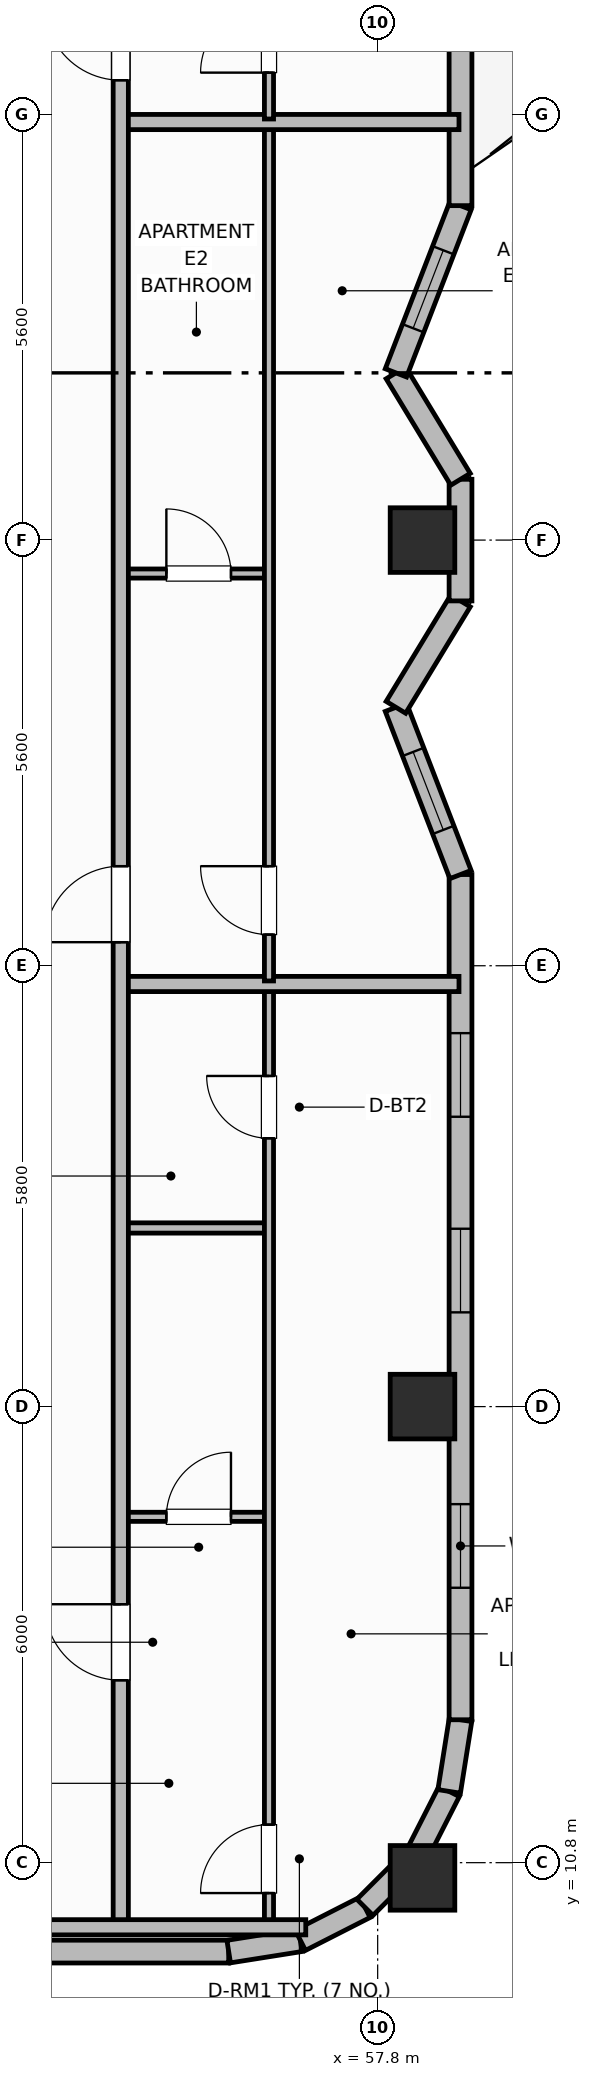
"""IFC4 building model, lengths in metres.
Left out: names, types, materials, properties, quantities, classifications, styles, units other than length and angle.
Written with IfcOpenShell. Run it as: python <this file> out.ifc"""

import sys

from ifc_helpers import new_model, si_unit, direction, frame, frame_2d, origin, origin_2d, place, context, subcontext, project, spatial, rectangle, extrude, element, fill, save


model = new_model("IFC4")
c1 = context("Model", 3, precision=1e-05, world=origin(), true_north=direction((0.0, 1.0)))
c2 = subcontext(c1, "Body", "Model", "MODEL_VIEW")
j1 = project(units=[si_unit("LENGTHUNIT", "METRE"), si_unit("PLANEANGLEUNIT", "RADIAN")], contexts=[c1])
p1 = place(None, origin())
s1 = spatial("IfcSite", under=j1, at=p1, CompositionType="ELEMENT")
p2 = place(p1, origin())
s2 = spatial("IfcBuilding", under=s1, at=p2, CompositionType="ELEMENT")
p3 = place(p2, frame((0.0, 0.0, 229.5)))
s3 = spatial("IfcBuildingStorey", under=s2, at=p3, CompositionType="ELEMENT", Elevation=229.5)
for number, where, z_axis, x_axis in (
    (1, (58.39, 10.6, 0.0), (0.0, 0.0, 1.0), (1.0, 0.0, 0.0)),
    (2, (58.39, 16.8, 0.0), (0.0, 0.0, 1.0), (1.0, 0.0, 0.0)),
    (3, (58.39, 28.2, 0.0), (0.0, 0.0, 1.0), (1.0, 0.0, 0.0)),
):
    element("IfcColumn", number, at=place(p3, frame(where, z_axis=z_axis, x_axis=x_axis)), inside=s3, PredefinedType="COLUMN", context=c2, shape_type="SweptSolid", body=[
        extrude(rectangle(XDim=0.85, YDim=0.85, at=origin_2d()), origin(), (0.0, 0.0, 1.0), 3.7),
    ])
p4 = place(p3, frame((22.56, 9.63, 0.0), z_axis=(0.0, 0.0, 1.0), x_axis=(1.0, 0.0, 0.0)))
e4 = element("IfcWall", 4, at=p4, inside=s3, PredefinedType="SOLIDWALL", context=c2, shape_type="SweptSolid", body=[
    extrude(rectangle(XDim=33.28, YDim=0.3, at=frame_2d((16.64, 0.0))), origin(), (0.0, 0.0, 1.0), 2.73),
])
p5 = place(p4, frame((4.747, 0.0, 0.76)))
e5 = element("IfcOpeningElement", 5, at=p5, cuts=e4, PredefinedType="OPENING", context=c2, shape_type="SweptSolid", body=[
    extrude(rectangle(XDim=1.4, YDim=1.85, at=frame_2d((0.7, 0.925))), frame((0.0, 0.16, 0.0), z_axis=(0.0, -1.0, 0.0), x_axis=(1.0, 0.0, 0.0)), (0.0, 0.0, 1.0), 0.32),
])
p6 = place(p4, frame((7.945, 0.0, 0.76)))
e6 = element("IfcOpeningElement", 6, at=p6, cuts=e4, PredefinedType="OPENING", context=c2, shape_type="SweptSolid", body=[
    extrude(rectangle(XDim=1.4, YDim=1.85, at=frame_2d((0.7, 0.925))), frame((0.0, 0.16, 0.0), z_axis=(0.0, -1.0, 0.0), x_axis=(1.0, 0.0, 0.0)), (0.0, 0.0, 1.0), 0.32),
])
p7 = place(p4, frame((14.341, 0.0, 0.76)))
e7 = element("IfcOpeningElement", 7, at=p7, cuts=e4, PredefinedType="OPENING", context=c2, shape_type="SweptSolid", body=[
    extrude(rectangle(XDim=1.4, YDim=1.85, at=frame_2d((0.7, 0.925))), frame((0.0, 0.16, 0.0), z_axis=(0.0, -1.0, 0.0), x_axis=(1.0, 0.0, 0.0)), (0.0, 0.0, 1.0), 0.32),
])
p8 = place(p4, frame((17.539, 0.0, 0.76)))
e8 = element("IfcOpeningElement", 8, at=p8, cuts=e4, PredefinedType="OPENING", context=c2, shape_type="SweptSolid", body=[
    extrude(rectangle(XDim=1.4, YDim=1.85, at=frame_2d((0.7, 0.925))), frame((0.0, 0.16, 0.0), z_axis=(0.0, -1.0, 0.0), x_axis=(1.0, 0.0, 0.0)), (0.0, 0.0, 1.0), 0.32),
])
p9 = place(p4, frame((23.935, 0.0, 0.76)))
e9 = element("IfcOpeningElement", 9, at=p9, cuts=e4, PredefinedType="OPENING", context=c2, shape_type="SweptSolid", body=[
    extrude(rectangle(XDim=1.4, YDim=1.85, at=frame_2d((0.7, 0.925))), frame((0.0, 0.16, 0.0), z_axis=(0.0, -1.0, 0.0), x_axis=(1.0, 0.0, 0.0)), (0.0, 0.0, 1.0), 0.32),
])
p10 = place(p4, frame((27.133, 0.0, 0.76)))
e10 = element("IfcOpeningElement", 10, at=p10, cuts=e4, PredefinedType="OPENING", context=c2, shape_type="SweptSolid", body=[
    extrude(rectangle(XDim=1.4, YDim=1.85, at=frame_2d((0.7, 0.925))), frame((0.0, 0.16, 0.0), z_axis=(0.0, -1.0, 0.0), x_axis=(1.0, 0.0, 0.0)), (0.0, 0.0, 1.0), 0.32),
])
p11 = place(p3, frame((55.84, 9.63, 0.0), z_axis=(0.0, 0.0, 1.0), x_axis=(0.987663181641, 0.156593229835, 0.0)))
e11 = element("IfcWall", 11, at=p11, inside=s3, PredefinedType="SOLIDWALL", context=c2, shape_type="SweptSolid", body=[
    extrude(rectangle(XDim=0.954, YDim=0.3, at=frame_2d((0.477, 0.0))), origin(), (0.0, 0.0, 1.0), 2.73),
])
for number, where, z_axis, x_axis in (
    (12, (56.782, 9.779, 0.0), (0.0, 0.0, 1.0), (0.891, 0.454, 0.0)),
    (13, (57.633, 10.212, 0.0), (0.0, 0.0, 1.0), (0.707, 0.707, 0.0)),
    (14, (58.308, 10.887, 0.0), (0.0, 0.0, 1.0), (0.454, 0.891, 0.0)),
):
    element("IfcWall", number, at=place(p3, frame(where, z_axis=z_axis, x_axis=x_axis)), inside=s3, PredefinedType="SOLIDWALL", context=c2, shape_type="SweptSolid", body=[
        extrude(rectangle(XDim=0.954, YDim=0.3, at=frame_2d((0.477, 0.0))), origin(), (0.0, 0.0, 1.0), 2.73),
    ])
p12 = place(p3, frame((58.741, 11.738, 0.0), z_axis=(0.0, 0.0, 1.0), x_axis=(0.156343617883, 0.987702725088, 0.0)))
e15 = element("IfcWall", 15, at=p12, inside=s3, PredefinedType="SOLIDWALL", context=c2, shape_type="SweptSolid", body=[
    extrude(rectangle(XDim=0.954, YDim=0.3, at=frame_2d((0.477, 0.0))), origin(), (0.0, 0.0, 1.0), 2.73),
])
p13 = place(p3, frame((58.89, 12.68, 0.0), z_axis=(0.0, 0.0, 1.0), x_axis=(0.0, 1.0, 0.0)))
e16 = element("IfcWall", 16, at=p13, inside=s3, PredefinedType="SOLIDWALL", context=c2, shape_type="SweptSolid", body=[
    extrude(rectangle(XDim=11.12, YDim=0.3, at=frame_2d((5.56, 0.0))), origin(), (0.0, 0.0, 1.0), 2.73),
])
p14 = place(p13, frame((1.737, 0.0, 0.95)))
e17 = element("IfcOpeningElement", 17, at=p14, cuts=e16, PredefinedType="OPENING", context=c2, shape_type="SweptSolid", body=[
    extrude(rectangle(XDim=1.1, YDim=1.65, at=frame_2d((0.55, 0.825))), frame((0.0, 0.16, 0.0), z_axis=(0.0, -1.0, 0.0), x_axis=(1.0, 0.0, 0.0)), (0.0, 0.0, 1.0), 0.32),
])
p15 = place(p13, frame((5.36, 0.0, 0.95)))
e18 = element("IfcOpeningElement", 18, at=p15, cuts=e16, PredefinedType="OPENING", context=c2, shape_type="SweptSolid", body=[
    extrude(rectangle(XDim=1.1, YDim=1.65, at=frame_2d((0.55, 0.825))), frame((0.0, 0.16, 0.0), z_axis=(0.0, -1.0, 0.0), x_axis=(1.0, 0.0, 0.0)), (0.0, 0.0, 1.0), 0.32),
])
p16 = place(p13, frame((7.933, 0.0, 0.95)))
e19 = element("IfcOpeningElement", 19, at=p16, cuts=e16, PredefinedType="OPENING", context=c2, shape_type="SweptSolid", body=[
    extrude(rectangle(XDim=1.1, YDim=1.65, at=frame_2d((0.55, 0.825))), frame((0.0, 0.16, 0.0), z_axis=(0.0, -1.0, 0.0), x_axis=(1.0, 0.0, 0.0)), (0.0, 0.0, 1.0), 0.32),
])
p17 = place(p3, frame((58.89, 23.8, 0.0), z_axis=(0.0, 0.0, 1.0), x_axis=(-0.360352194711, 0.932816324775, 0.0)))
e20 = element("IfcWall", 20, at=p17, inside=s3, PredefinedType="SOLIDWALL", context=c2, shape_type="SweptSolid", body=[
    extrude(rectangle(XDim=2.358, YDim=0.3, at=frame_2d((1.179, 0.0))), origin(), (0.0, 0.0, 1.0), 2.73),
])
p18 = place(p17, frame((0.629, 0.0, 0.92)))
e21 = element("IfcOpeningElement", 21, at=p18, cuts=e20, PredefinedType="OPENING", context=c2, shape_type="SweptSolid", body=[
    extrude(rectangle(XDim=1.1, YDim=1.65, at=frame_2d((0.55, 0.825))), frame((0.0, 0.16, 0.0), z_axis=(0.0, -1.0, 0.0), x_axis=(1.0, 0.0, 0.0)), (0.0, 0.0, 1.0), 0.32),
])
p19 = place(p3, frame((58.04, 26.0, 0.0), z_axis=(0.0, 0.0, 1.0), x_axis=(0.518939231806, 0.854811133346, 0.0)))
e22 = element("IfcWall", 22, at=p19, inside=s3, PredefinedType="SOLIDWALL", context=c2, shape_type="SweptSolid", body=[
    extrude(rectangle(XDim=1.638, YDim=0.3, at=frame_2d((0.819, 0.0))), origin(), (0.0, 0.0, 1.0), 2.73),
])
p20 = place(p3, frame((58.89, 27.4, 0.0), z_axis=(0.0, 0.0, 1.0), x_axis=(0.0, 1.0, 0.0)))
e23 = element("IfcWall", 23, at=p20, inside=s3, PredefinedType="SOLIDWALL", context=c2, shape_type="SweptSolid", body=[
    extrude(rectangle(XDim=1.6, YDim=0.3, at=frame_2d((0.8, 0.0))), origin(), (0.0, 0.0, 1.0), 2.73),
])
p21 = place(p3, frame((58.89, 29.0, 0.0), z_axis=(0.0, 0.0, 1.0), x_axis=(-0.518939231806, 0.854811133346, 0.0)))
e24 = element("IfcWall", 24, at=p21, inside=s3, PredefinedType="SOLIDWALL", context=c2, shape_type="SweptSolid", body=[
    extrude(rectangle(XDim=1.638, YDim=0.3, at=frame_2d((0.819, 0.0))), origin(), (0.0, 0.0, 1.0), 2.73),
])
p22 = place(p3, frame((58.04, 30.4, 0.0), z_axis=(0.0, 0.0, 1.0), x_axis=(0.360317400447, 0.932829765249, 0.0)))
e25 = element("IfcWall", 25, at=p22, inside=s3, PredefinedType="SOLIDWALL", context=c2, shape_type="SweptSolid", body=[
    extrude(rectangle(XDim=2.359, YDim=0.3, at=frame_2d((1.179, 0.0))), origin(), (0.0, 0.0, 1.0), 2.73),
])
p23 = place(p22, frame((0.629, 0.0, 0.92)))
e26 = element("IfcOpeningElement", 26, at=p23, cuts=e25, PredefinedType="OPENING", context=c2, shape_type="SweptSolid", body=[
    extrude(rectangle(XDim=1.1, YDim=1.65, at=frame_2d((0.55, 0.825))), frame((0.0, 0.16, 0.0), z_axis=(0.0, -1.0, 0.0), x_axis=(1.0, 0.0, 0.0)), (0.0, 0.0, 1.0), 0.32),
])
p24 = place(p3, frame((58.89, 32.6, 0.0), z_axis=(0.0, 0.0, 1.0), x_axis=(0.0, 1.0, 0.0)))
e27 = element("IfcWall", 27, at=p24, inside=s3, PredefinedType="SOLIDWALL", context=c2, shape_type="SweptSolid", body=[
    extrude(rectangle(XDim=11.12, YDim=0.3, at=frame_2d((5.56, 0.0))), origin(), (0.0, 0.0, 1.0), 2.73),
])
p25 = place(p24, frame((2.1, 0.0, 0.0)))
e28 = element("IfcOpeningElement", 28, at=p25, cuts=e27, PredefinedType="OPENING", context=c2, shape_type="SweptSolid", body=[
    extrude(rectangle(XDim=1.6, YDim=2.1, at=frame_2d((0.8, 1.05))), frame((0.0, 0.16, 0.0), z_axis=(0.0, -1.0, 0.0), x_axis=(1.0, 0.0, 0.0)), (0.0, 0.0, 1.0), 0.32),
])
p26 = place(p3, frame((54.42, 15.35, 0.0), z_axis=(0.0, 0.0, 1.0), x_axis=(1.0, 0.0, 0.0)))
e29 = element("IfcWall", 29, at=p26, inside=s3, PredefinedType="PARTITIONING", context=c2, shape_type="SweptSolid", body=[
    extrude(rectangle(XDim=1.95, YDim=0.12, at=frame_2d((0.975, 0.0))), origin(), (0.0, 0.0, 1.0), 2.56),
])
p27 = place(p26, frame((0.6, 0.0, 0.0)))
e30 = element("IfcOpeningElement", 30, at=p27, cuts=e29, PredefinedType="OPENING", context=c2, shape_type="SweptSolid", body=[
    extrude(rectangle(XDim=0.85, YDim=2.1, at=frame_2d((0.425, 1.05))), frame((0.0, 0.07, 0.0), z_axis=(0.0, -1.0, 0.0), x_axis=(1.0, 0.0, 0.0)), (0.0, 0.0, 1.0), 0.14),
])
p28 = place(p3, frame((54.42, 19.15, 0.0), z_axis=(0.0, 0.0, 1.0), x_axis=(1.0, 0.0, 0.0)))
e31 = element("IfcWall", 31, at=p28, inside=s3, PredefinedType="PARTITIONING", context=c2, shape_type="SweptSolid", body=[
    extrude(rectangle(XDim=1.95, YDim=0.135, at=frame_2d((0.975, 0.0))), origin(), (0.0, 0.0, 1.0), 2.56),
])
p29 = place(p3, frame((56.37, 9.99, 0.0), z_axis=(0.0, 0.0, 1.0), x_axis=(0.0, 1.0, 0.0)))
e32 = element("IfcWall", 32, at=p29, inside=s3, PredefinedType="PARTITIONING", context=c2, shape_type="SweptSolid", body=[
    extrude(rectangle(XDim=12.33, YDim=0.12, at=frame_2d((6.165, 0.0))), origin(), (0.0, 0.0, 1.0), 2.56),
])
p30 = place(p29, frame((0.41, 0.0, 0.0)))
e33 = element("IfcOpeningElement", 33, at=p30, cuts=e32, PredefinedType="OPENING", context=c2, shape_type="SweptSolid", body=[
    extrude(rectangle(XDim=0.9, YDim=2.1, at=frame_2d((0.45, 1.05))), frame((0.0, 0.07, 0.0), z_axis=(0.0, -1.0, 0.0), x_axis=(1.0, 0.0, 0.0)), (0.0, 0.0, 1.0), 0.14),
])
p31 = place(p29, frame((10.34, 0.0, 0.0)))
e34 = element("IfcOpeningElement", 34, at=p31, cuts=e32, PredefinedType="OPENING", context=c2, shape_type="SweptSolid", body=[
    extrude(rectangle(XDim=0.82, YDim=2.08, at=frame_2d((0.41, 1.04))), frame((0.0, 0.07, 0.0), z_axis=(0.0, -1.0, 0.0), x_axis=(1.0, 0.0, 0.0)), (0.0, 0.0, 1.0), 0.14),
])
p32 = place(p3, frame((54.42, 22.36, 0.0), z_axis=(0.0, 0.0, 1.0), x_axis=(1.0, 0.0, 0.0)))
e35 = element("IfcWall", 35, at=p32, inside=s3, PredefinedType="PARTITIONING", context=c2, shape_type="SweptSolid", body=[
    extrude(rectangle(XDim=4.45, YDim=0.2, at=frame_2d((2.225, 0.0))), origin(), (0.0, 0.0, 1.0), 2.56),
])
p33 = place(p3, frame((54.42, 27.76, 0.0), z_axis=(0.0, 0.0, 1.0), x_axis=(1.0, 0.0, 0.0)))
e36 = element("IfcWall", 36, at=p33, inside=s3, PredefinedType="PARTITIONING", context=c2, shape_type="SweptSolid", body=[
    extrude(rectangle(XDim=1.95, YDim=0.12, at=frame_2d((0.975, 0.0))), origin(), (0.0, 0.0, 1.0), 2.56),
])
p34 = place(p33, frame((0.6, 0.0, 0.0)))
e37 = element("IfcOpeningElement", 37, at=p34, cuts=e36, PredefinedType="OPENING", context=c2, shape_type="SweptSolid", body=[
    extrude(rectangle(XDim=0.85, YDim=2.1, at=frame_2d((0.425, 1.05))), frame((0.0, 0.07, 0.0), z_axis=(0.0, -1.0, 0.0), x_axis=(1.0, 0.0, 0.0)), (0.0, 0.0, 1.0), 0.14),
])
p35 = place(p3, frame((56.37, 22.4, 0.0), z_axis=(0.0, 0.0, 1.0), x_axis=(0.0, 1.0, 0.0)))
e38 = element("IfcWall", 38, at=p35, inside=s3, PredefinedType="PARTITIONING", context=c2, shape_type="SweptSolid", body=[
    extrude(rectangle(XDim=11.26, YDim=0.12, at=frame_2d((5.63, 0.0))), origin(), (0.0, 0.0, 1.0), 2.56),
])
p36 = place(p35, frame((0.61, 0.0, 0.0)))
e39 = element("IfcOpeningElement", 39, at=p36, cuts=e38, PredefinedType="OPENING", context=c2, shape_type="SweptSolid", body=[
    extrude(rectangle(XDim=0.9, YDim=2.1, at=frame_2d((0.45, 1.05))), frame((0.0, 0.07, 0.0), z_axis=(0.0, -1.0, 0.0), x_axis=(1.0, 0.0, 0.0)), (0.0, 0.0, 1.0), 0.14),
])
p37 = place(p3, frame((54.42, 33.7, 0.0), z_axis=(0.0, 0.0, 1.0), x_axis=(1.0, 0.0, 0.0)))
e40 = element("IfcWall", 40, at=p37, inside=s3, PredefinedType="PARTITIONING", context=c2, shape_type="SweptSolid", body=[
    extrude(rectangle(XDim=4.45, YDim=0.2, at=frame_2d((2.225, 0.0))), origin(), (0.0, 0.0, 1.0), 2.56),
])
p38 = place(p3, frame((56.37, 33.74, 0.0), z_axis=(0.0, 0.0, 1.0), x_axis=(0.0, 1.0, 0.0)))
e41 = element("IfcWall", 41, at=p38, inside=s3, PredefinedType="PARTITIONING", context=c2, shape_type="SweptSolid", body=[
    extrude(rectangle(XDim=12.67, YDim=0.12, at=frame_2d((6.335, 0.0))), origin(), (0.0, 0.0, 1.0), 2.56),
])
p39 = place(p38, frame((0.61, 0.0, 0.0)))
e42 = element("IfcOpeningElement", 42, at=p39, cuts=e41, PredefinedType="OPENING", context=c2, shape_type="SweptSolid", body=[
    extrude(rectangle(XDim=0.9, YDim=2.1, at=frame_2d((0.45, 1.05))), frame((0.0, 0.07, 0.0), z_axis=(0.0, -1.0, 0.0), x_axis=(1.0, 0.0, 0.0)), (0.0, 0.0, 1.0), 0.14),
])
p40 = place(p38, frame((10.51, 0.0, 0.0)))
e43 = element("IfcOpeningElement", 43, at=p40, cuts=e41, PredefinedType="OPENING", context=c2, shape_type="SweptSolid", body=[
    extrude(rectangle(XDim=0.82, YDim=2.08, at=frame_2d((0.41, 1.04))), frame((0.0, 0.07, 0.0), z_axis=(0.0, -1.0, 0.0), x_axis=(1.0, 0.0, 0.0)), (0.0, 0.0, 1.0), 0.14),
])
p41 = place(p3, frame((54.42, 9.95, 0.0), z_axis=(0.0, 0.0, 1.0), x_axis=(0.0, 1.0, 0.0)))
e44 = element("IfcWall", 44, at=p41, inside=s3, PredefinedType="PARTITIONING", context=c2, shape_type="SweptSolid", body=[
    extrude(rectangle(XDim=36.5, YDim=0.2, at=frame_2d((18.25, 0.0))), origin(), (0.0, 0.0, 1.0), 2.56),
])
p42 = place(p41, frame((3.25, 0.0, 0.0)))
e45 = element("IfcOpeningElement", 45, at=p42, cuts=e44, PredefinedType="OPENING", context=c2, shape_type="SweptSolid", body=[
    extrude(rectangle(XDim=1.0, YDim=2.15, at=frame_2d((0.5, 1.075))), frame((0.0, 0.11, 0.0), z_axis=(0.0, -1.0, 0.0), x_axis=(1.0, 0.0, 0.0)), (0.0, 0.0, 1.0), 0.22),
])
p43 = place(p41, frame((12.96, 0.0, 0.0)))
e46 = element("IfcOpeningElement", 46, at=p43, cuts=e44, PredefinedType="OPENING", context=c2, shape_type="SweptSolid", body=[
    extrude(rectangle(XDim=1.0, YDim=2.15, at=frame_2d((0.5, 1.075))), frame((0.0, 0.11, 0.0), z_axis=(0.0, -1.0, 0.0), x_axis=(1.0, 0.0, 0.0)), (0.0, 0.0, 1.0), 0.22),
])
p44 = place(p41, frame((24.3, 0.0, 0.0)))
e47 = element("IfcOpeningElement", 47, at=p44, cuts=e44, PredefinedType="OPENING", context=c2, shape_type="SweptSolid", body=[
    extrude(rectangle(XDim=1.0, YDim=2.15, at=frame_2d((0.5, 1.075))), frame((0.0, 0.11, 0.0), z_axis=(0.0, -1.0, 0.0), x_axis=(1.0, 0.0, 0.0)), (0.0, 0.0, 1.0), 0.22),
])
p45 = place(p3, frame((53.1, 9.95, 0.0), z_axis=(0.0, 0.0, 1.0), x_axis=(1.0, 0.0, 0.0)))
e48 = element("IfcWall", 48, at=p45, inside=s3, PredefinedType="PARTITIONING", context=c2, shape_type="SweptSolid", body=[
    extrude(rectangle(XDim=3.754, YDim=0.2, at=frame_2d((1.877, 0.0))), origin(), (0.0, 0.0, 1.0), 2.56),
])
p46 = place(p14, origin())
e49 = element("IfcWindow", 49, at=p46, inside=s3, PartitioningType="SINGLE_PANEL", PredefinedType="WINDOW", context=c2, shape_type="SweptSolid", body=[
    extrude(rectangle(XDim=1.1, YDim=1.65, at=frame_2d((0.55, 0.825))), frame((0.0, 0.03, 0.0), z_axis=(0.0, -1.0, 0.0), x_axis=(1.0, 0.0, 0.0)), (0.0, 0.0, 1.0), 0.06),
])
fill(e17, e49)
p47 = place(p15, origin())
e50 = element("IfcWindow", 50, at=p47, inside=s3, PartitioningType="SINGLE_PANEL", PredefinedType="WINDOW", context=c2, shape_type="SweptSolid", body=[
    extrude(rectangle(XDim=1.1, YDim=1.65, at=frame_2d((0.55, 0.825))), frame((0.0, 0.03, 0.0), z_axis=(0.0, -1.0, 0.0), x_axis=(1.0, 0.0, 0.0)), (0.0, 0.0, 1.0), 0.06),
])
fill(e18, e50)
p48 = place(p16, origin())
e51 = element("IfcWindow", 51, at=p48, inside=s3, PartitioningType="SINGLE_PANEL", PredefinedType="WINDOW", context=c2, shape_type="SweptSolid", body=[
    extrude(rectangle(XDim=1.1, YDim=1.65, at=frame_2d((0.55, 0.825))), frame((0.0, 0.03, 0.0), z_axis=(0.0, -1.0, 0.0), x_axis=(1.0, 0.0, 0.0)), (0.0, 0.0, 1.0), 0.06),
])
fill(e19, e51)
p49 = place(p18, origin())
e52 = element("IfcWindow", 52, at=p49, inside=s3, PartitioningType="SINGLE_PANEL", PredefinedType="WINDOW", context=c2, shape_type="SweptSolid", body=[
    extrude(rectangle(XDim=1.1, YDim=1.65, at=frame_2d((0.55, 0.825))), frame((0.0, 0.03, 0.0), z_axis=(0.0, -1.0, 0.0), x_axis=(1.0, 0.0, 0.0)), (0.0, 0.0, 1.0), 0.06),
])
fill(e21, e52)
p50 = place(p23, origin())
e53 = element("IfcWindow", 53, at=p50, inside=s3, PartitioningType="SINGLE_PANEL", PredefinedType="WINDOW", context=c2, shape_type="SweptSolid", body=[
    extrude(rectangle(XDim=1.1, YDim=1.65, at=frame_2d((0.55, 0.825))), frame((0.0, 0.03, 0.0), z_axis=(0.0, -1.0, 0.0), x_axis=(1.0, 0.0, 0.0)), (0.0, 0.0, 1.0), 0.06),
])
fill(e26, e53)
p51 = place(p27, origin())
e54 = element("IfcDoor", 54, at=p51, inside=s3, OperationType="SINGLE_SWING_RIGHT", PredefinedType="DOOR", context=c2, shape_type="SweptSolid", body=[
    extrude(rectangle(XDim=0.85, YDim=2.1, at=frame_2d((0.425, 1.05))), frame((0.0, 0.025, 0.0), z_axis=(0.0, -1.0, 0.0), x_axis=(1.0, 0.0, 0.0)), (0.0, 0.0, 1.0), 0.05),
])
fill(e30, e54)
p52 = place(p30, origin())
e55 = element("IfcDoor", 55, at=p52, inside=s3, OperationType="SINGLE_SWING_LEFT", PredefinedType="DOOR", context=c2, shape_type="SweptSolid", body=[
    extrude(rectangle(XDim=0.9, YDim=2.1, at=frame_2d((0.45, 1.05))), frame((0.0, 0.025, 0.0), z_axis=(0.0, -1.0, 0.0), x_axis=(1.0, 0.0, 0.0)), (0.0, 0.0, 1.0), 0.05),
])
fill(e33, e55)
p53 = place(p31, origin())
e56 = element("IfcDoor", 56, at=p53, inside=s3, OperationType="SINGLE_SWING_RIGHT", PredefinedType="DOOR", context=c2, shape_type="SweptSolid", body=[
    extrude(rectangle(XDim=0.82, YDim=2.08, at=frame_2d((0.41, 1.04))), frame((0.0, 0.025, 0.0), z_axis=(0.0, -1.0, 0.0), x_axis=(1.0, 0.0, 0.0)), (0.0, 0.0, 1.0), 0.05),
])
fill(e34, e56)
p54 = place(p34, origin())
e57 = element("IfcDoor", 57, at=p54, inside=s3, OperationType="SINGLE_SWING_LEFT", PredefinedType="DOOR", context=c2, shape_type="SweptSolid", body=[
    extrude(rectangle(XDim=0.85, YDim=2.1, at=frame_2d((0.425, 1.05))), frame((0.0, 0.025, 0.0), z_axis=(0.0, -1.0, 0.0), x_axis=(1.0, 0.0, 0.0)), (0.0, 0.0, 1.0), 0.05),
])
fill(e37, e57)
p55 = place(p36, origin())
e58 = element("IfcDoor", 58, at=p55, inside=s3, OperationType="SINGLE_SWING_RIGHT", PredefinedType="DOOR", context=c2, shape_type="SweptSolid", body=[
    extrude(rectangle(XDim=0.9, YDim=2.1, at=frame_2d((0.45, 1.05))), frame((0.0, 0.025, 0.0), z_axis=(0.0, -1.0, 0.0), x_axis=(1.0, 0.0, 0.0)), (0.0, 0.0, 1.0), 0.05),
])
fill(e39, e58)
p56 = place(p39, origin())
e59 = element("IfcDoor", 59, at=p56, inside=s3, OperationType="SINGLE_SWING_LEFT", PredefinedType="DOOR", context=c2, shape_type="SweptSolid", body=[
    extrude(rectangle(XDim=0.9, YDim=2.1, at=frame_2d((0.45, 1.05))), frame((0.0, 0.025, 0.0), z_axis=(0.0, -1.0, 0.0), x_axis=(1.0, 0.0, 0.0)), (0.0, 0.0, 1.0), 0.05),
])
fill(e42, e59)
p57 = place(p42, origin())
e60 = element("IfcDoor", 60, at=p57, inside=s3, OperationType="SINGLE_SWING_RIGHT", PredefinedType="DOOR", context=c2, shape_type="SweptSolid", body=[
    extrude(rectangle(XDim=1.0, YDim=2.15, at=frame_2d((0.5, 1.075))), frame((0.0, 0.025, 0.0), z_axis=(0.0, -1.0, 0.0), x_axis=(1.0, 0.0, 0.0)), (0.0, 0.0, 1.0), 0.05),
])
fill(e45, e60)
p58 = place(p43, origin())
e61 = element("IfcDoor", 61, at=p58, inside=s3, OperationType="SINGLE_SWING_LEFT", PredefinedType="DOOR", context=c2, shape_type="SweptSolid", body=[
    extrude(rectangle(XDim=1.0, YDim=2.15, at=frame_2d((0.5, 1.075))), frame((0.0, 0.025, 0.0), z_axis=(0.0, -1.0, 0.0), x_axis=(1.0, 0.0, 0.0)), (0.0, 0.0, 1.0), 0.05),
])
fill(e46, e61)
p59 = place(p44, origin())
e62 = element("IfcDoor", 62, at=p59, inside=s3, OperationType="SINGLE_SWING_RIGHT", PredefinedType="DOOR", context=c2, shape_type="SweptSolid", body=[
    extrude(rectangle(XDim=1.0, YDim=2.15, at=frame_2d((0.5, 1.075))), frame((0.0, 0.025, 0.0), z_axis=(0.0, -1.0, 0.0), x_axis=(1.0, 0.0, 0.0)), (0.0, 0.0, 1.0), 0.05),
])
fill(e47, e62)
save(model, sys.argv[1])
